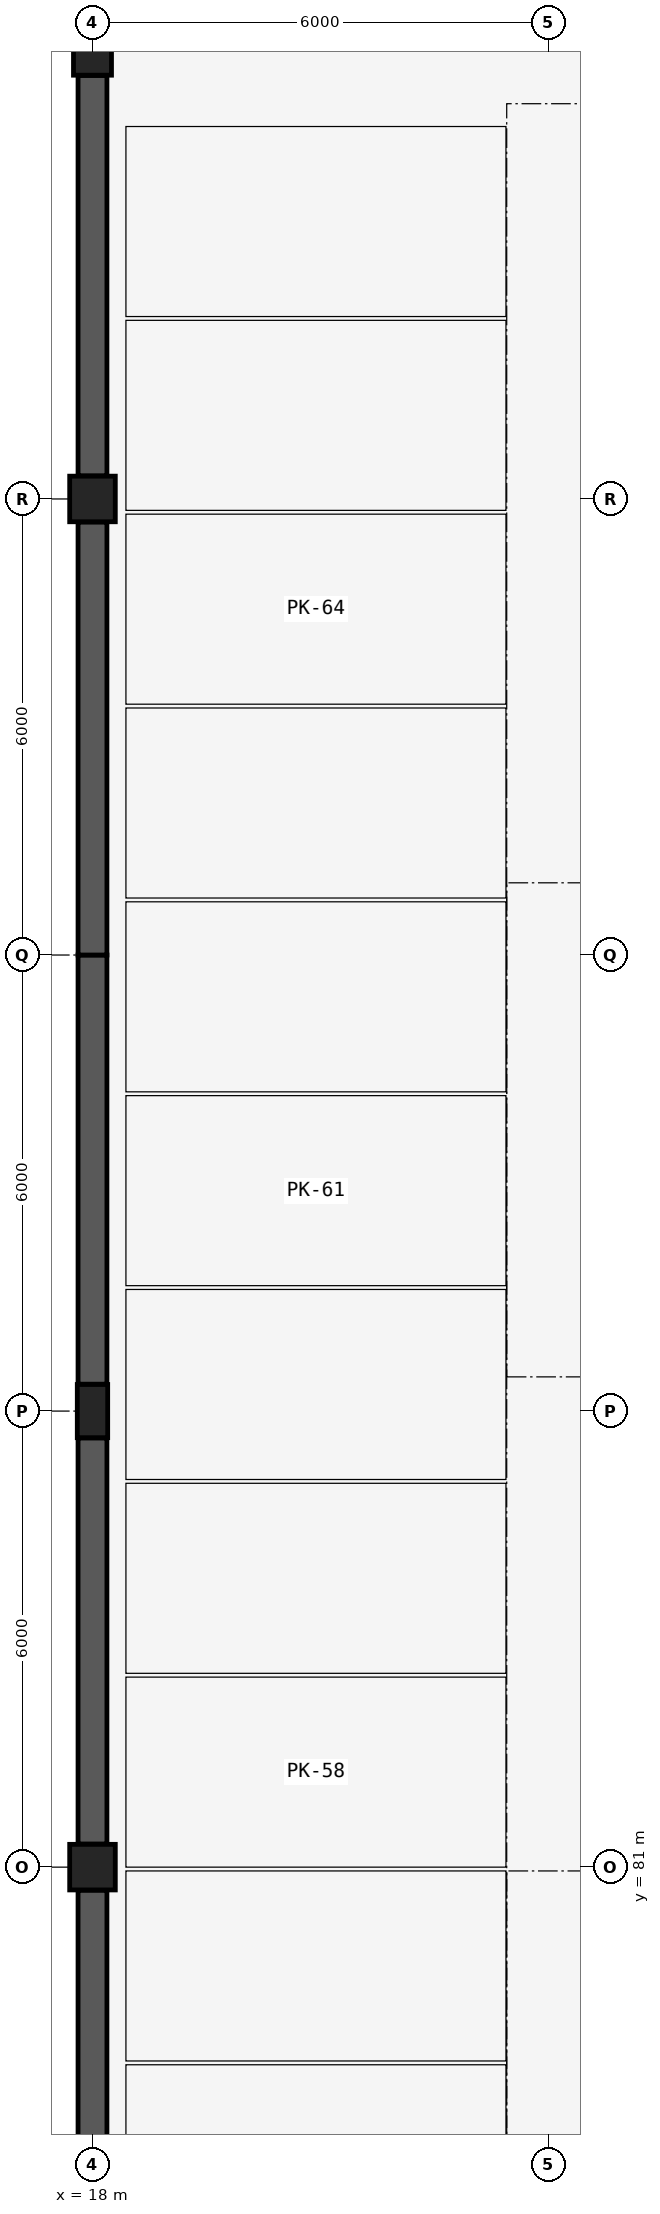
"""IFC4 building model, lengths in metres.
Left out: names, types, materials, properties, quantities, classifications, styles, units other than length and angle.
Written with IfcOpenShell. Run it as: python <this file> out.ifc"""

import sys

from ifc_helpers import new_model, si_unit, direction, frame, frame_2d, origin, origin_2d, place, context, subcontext, project, spatial, rectangle, extrude, element, save


model = new_model("IFC4")
c1 = context("Model", 3, precision=1e-05, world=origin(), true_north=direction((0.0, 1.0)))
c2 = subcontext(c1, "Body", "Model", "MODEL_VIEW")
j1 = project(units=[si_unit("LENGTHUNIT", "METRE"), si_unit("PLANEANGLEUNIT", "RADIAN")], contexts=[c1])
p1 = place(None, origin())
s1 = spatial("IfcSite", under=j1, at=p1, CompositionType="ELEMENT")
p2 = place(p1, origin())
s2 = spatial("IfcBuilding", under=s1, at=p2, CompositionType="ELEMENT")
p3 = place(p2, frame((0.0, 0.0, -4.5)))
s3 = spatial("IfcBuildingStorey", under=s2, at=p3, CompositionType="ELEMENT", Elevation=-4.5)
p4 = place(p3, frame((18.0, 81.0, 0.0), z_axis=(0.0, 0.0, 1.0), x_axis=(1.0, 0.0, 0.0)))
e1 = element("IfcColumn", 1, at=p4, inside=s3, PredefinedType="COLUMN", context=c2, shape_type="SweptSolid", body=[
    extrude(rectangle(XDim=0.6, YDim=0.6, at=origin_2d()), origin(), (0.0, 0.0, 1.0), 4.5),
])
p5 = place(p3, frame((18.0, 87.0, 0.0), z_axis=(0.0, 0.0, 1.0), x_axis=(1.0, 0.0, 0.0)))
e2 = element("IfcColumn", 2, at=p5, inside=s3, PredefinedType="COLUMN", context=c2, shape_type="SweptSolid", body=[
    extrude(rectangle(XDim=0.4, YDim=0.7, at=origin_2d()), origin(), (0.0, 0.0, 1.0), 4.5),
])
p6 = place(p3, frame((18.0, 99.0, 0.0), z_axis=(0.0, 0.0, 1.0), x_axis=(1.0, 0.0, 0.0)))
e3 = element("IfcColumn", 3, at=p6, inside=s3, PredefinedType="COLUMN", context=c2, shape_type="SweptSolid", body=[
    extrude(rectangle(XDim=0.6, YDim=0.6, at=origin_2d()), origin(), (0.0, 0.0, 1.0), 4.5),
])
p7 = place(p3, frame((18.0, 105.0, 0.0), z_axis=(0.0, 0.0, 1.0), x_axis=(1.0, 0.0, 0.0)))
e4 = element("IfcColumn", 4, at=p7, inside=s3, PredefinedType="COLUMN", context=c2, shape_type="SweptSolid", body=[
    extrude(rectangle(XDim=0.5, YDim=0.85, at=origin_2d()), origin(), (0.0, 0.0, 1.0), 4.5),
])
p8 = place(p3, frame((18.0, 75.379, 0.0), z_axis=(0.0, 0.0, 1.0), x_axis=(0.0, 1.0, 0.0)))
e5 = element("IfcWall", 5, at=p8, inside=s3, PredefinedType="SHEAR", context=c2, shape_type="SweptSolid", body=[
    extrude(rectangle(XDim=5.317, YDim=0.38, at=frame_2d((2.659, 0.0))), origin(), (0.0, 0.0, 1.0), 4.195),
])
p9 = place(p3, frame((18.0, 81.304, 0.0), z_axis=(0.0, 0.0, 1.0), x_axis=(0.0, 1.0, 0.0)))
e6 = element("IfcWall", 6, at=p9, inside=s3, PredefinedType="SHEAR", context=c2, shape_type="SweptSolid", body=[
    extrude(rectangle(XDim=5.342, YDim=0.38, at=frame_2d((2.671, 0.0))), origin(), (0.0, 0.0, 1.0), 4.195),
])
p10 = place(p3, frame((18.0, 87.354, 0.0), z_axis=(0.0, 0.0, 1.0), x_axis=(0.0, 1.0, 0.0)))
e7 = element("IfcWall", 7, at=p10, inside=s3, PredefinedType="SHEAR", context=c2, shape_type="SweptSolid", body=[
    extrude(rectangle(XDim=5.646, YDim=0.38, at=frame_2d((2.823, 0.0))), origin(), (0.0, 0.0, 1.0), 4.195),
])
p11 = place(p3, frame((18.0, 93.0, 0.0), z_axis=(0.0, 0.0, 1.0), x_axis=(0.0, 1.0, 0.0)))
e8 = element("IfcWall", 8, at=p11, inside=s3, PredefinedType="SHEAR", context=c2, shape_type="SweptSolid", body=[
    extrude(rectangle(XDim=5.696, YDim=0.38, at=frame_2d((2.848, 0.0))), origin(), (0.0, 0.0, 1.0), 4.195),
])
p12 = place(p3, frame((18.0, 99.304, 0.0), z_axis=(0.0, 0.0, 1.0), x_axis=(0.0, 1.0, 0.0)))
e9 = element("IfcWall", 9, at=p12, inside=s3, PredefinedType="SHEAR", context=c2, shape_type="SweptSolid", body=[
    extrude(rectangle(XDim=5.267, YDim=0.38, at=frame_2d((2.634, 0.0))), origin(), (0.0, 0.0, 1.0), 4.195),
])
save(model, sys.argv[1])
